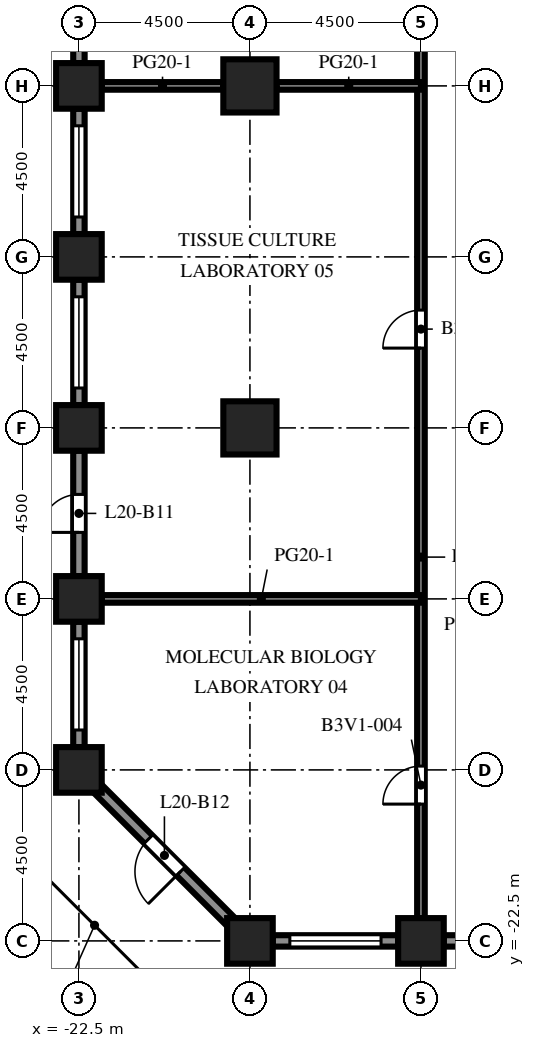
"""IFC4 building model, lengths in metres.
Left out: names, types, materials, properties, quantities, classifications, styles, units other than length and angle.
Written with IfcOpenShell. Run it as: python <this file> out.ifc"""

import sys

from ifc_helpers import new_model, si_unit, direction, frame, frame_2d, origin, origin_2d, place, context, subcontext, project, spatial, rectangle, extrude, element, fill, save


model = new_model("IFC4")
c1 = context("Model", 3, precision=1e-05, world=origin(), true_north=direction((0.0, 1.0)))
c2 = subcontext(c1, "Body", "Model", "MODEL_VIEW")
j1 = project(units=[si_unit("LENGTHUNIT", "METRE"), si_unit("PLANEANGLEUNIT", "RADIAN")], contexts=[c1])
p1 = place(None, origin())
s1 = spatial("IfcSite", under=j1, at=p1, CompositionType="ELEMENT")
p2 = place(p1, origin())
s2 = spatial("IfcBuilding", under=s1, at=p2, CompositionType="ELEMENT")
p3 = place(p2, frame((0.0, 0.0, 90.2)))
s3 = spatial("IfcBuildingStorey", under=s2, at=p3, CompositionType="ELEMENT", Elevation=90.2)
for number, where, z_axis, x_axis in (
    (1, (-22.5, -18.0, 0.0), (0.0, 0.0, 1.0), (1.0, 0.0, 0.0)),
    (2, (-22.5, -13.5, 0.0), (0.0, 0.0, 1.0), (1.0, 0.0, 0.0)),
    (3, (-22.5, -9.0, 0.0), (0.0, 0.0, 1.0), (1.0, 0.0, 0.0)),
    (4, (-22.5, -4.5, 0.0), (0.0, 0.0, 1.0), (1.0, 0.0, 0.0)),
    (5, (-22.5, 0.0, 0.0), (0.0, 0.0, 1.0), (1.0, 0.0, 0.0)),
    (6, (-18.0, -22.5, 0.0), (0.0, 0.0, 1.0), (1.0, 0.0, 0.0)),
    (7, (-13.5, -22.5, 0.0), (0.0, 0.0, 1.0), (1.0, 0.0, 0.0)),
):
    element("IfcColumn", number, at=place(p3, frame(where, z_axis=z_axis, x_axis=x_axis)), inside=s3, PredefinedType="COLUMN", context=c2, shape_type="SweptSolid", body=[
        extrude(rectangle(XDim=1.2, YDim=1.2, at=origin_2d()), origin(), (0.0, 0.0, 1.0), 4.1),
    ])
for number, where, z_axis, x_axis in (
    (8, (-18.0, -9.0, 0.0), (0.0, 0.0, 1.0), (1.0, 0.0, 0.0)),
    (9, (-18.0, 0.0, 0.0), (0.0, 0.0, 1.0), (1.0, 0.0, 0.0)),
):
    element("IfcColumn", number, at=place(p3, frame(where, z_axis=z_axis, x_axis=x_axis)), inside=s3, PredefinedType="COLUMN", context=c2, shape_type="SweptSolid", body=[
        extrude(rectangle(XDim=1.4, YDim=1.4, at=origin_2d()), origin(), (0.0, 0.0, 1.0), 4.1),
    ])
p4 = place(p3, frame((-14.1, -22.5, 0.0), z_axis=(0.0, 0.0, 1.0), x_axis=(-1.0, 0.0, 0.0)))
e10 = element("IfcWall", 10, at=p4, inside=s3, PredefinedType="SOLIDWALL", context=c2, shape_type="SweptSolid", body=[
    extrude(rectangle(XDim=3.3, YDim=0.3, at=frame_2d((1.65, 0.0))), origin(), (0.0, 0.0, 1.0), 2.75),
])
p5 = place(p4, frame((0.45, 0.0, 0.8)))
e11 = element("IfcOpeningElement", 11, at=p5, cuts=e10, PredefinedType="OPENING", context=c2, shape_type="SweptSolid", body=[
    extrude(rectangle(XDim=2.4, YDim=1.7, at=frame_2d((1.2, 0.85))), frame((0.0, 0.16, 0.0), z_axis=(0.0, -1.0, 0.0), x_axis=(1.0, 0.0, 0.0)), (0.0, 0.0, 1.0), 0.32),
])
p6 = place(p3, frame((-9.6, -22.5, 0.0), z_axis=(0.0, 0.0, 1.0), x_axis=(-1.0, 0.0, 0.0)))
e12 = element("IfcWall", 12, at=p6, inside=s3, PredefinedType="SOLIDWALL", context=c2, shape_type="SweptSolid", body=[
    extrude(rectangle(XDim=3.3, YDim=0.3, at=frame_2d((1.65, 0.0))), origin(), (0.0, 0.0, 1.0), 2.75),
])
p7 = place(p6, frame((1.15, 0.0, 0.0)))
e13 = element("IfcOpeningElement", 13, at=p7, cuts=e12, PredefinedType="OPENING", context=c2, shape_type="SweptSolid", body=[
    extrude(rectangle(XDim=1.0, YDim=2.2, at=frame_2d((0.5, 1.1))), frame((0.0, 0.16, 0.0), z_axis=(0.0, -1.0, 0.0), x_axis=(1.0, 0.0, 0.0)), (0.0, 0.0, 1.0), 0.32),
])
p8 = place(p3, frame((-22.5, 0.6, 0.0), z_axis=(0.0, 0.0, 1.0), x_axis=(0.0, 1.0, 0.0)))
e14 = element("IfcWall", 14, at=p8, inside=s3, PredefinedType="SOLIDWALL", context=c2, shape_type="SweptSolid", body=[
    extrude(rectangle(XDim=3.3, YDim=0.3, at=frame_2d((1.65, 0.0))), origin(), (0.0, 0.0, 1.0), 2.75),
])
p9 = place(p8, frame((0.45, 0.0, 0.8)))
e15 = element("IfcOpeningElement", 15, at=p9, cuts=e14, PredefinedType="OPENING", context=c2, shape_type="SweptSolid", body=[
    extrude(rectangle(XDim=2.4, YDim=1.7, at=frame_2d((1.2, 0.85))), frame((0.0, 0.16, 0.0), z_axis=(0.0, -1.0, 0.0), x_axis=(1.0, 0.0, 0.0)), (0.0, 0.0, 1.0), 0.32),
])
p10 = place(p3, frame((-22.5, -3.9, 0.0), z_axis=(0.0, 0.0, 1.0), x_axis=(0.0, 1.0, 0.0)))
e16 = element("IfcWall", 16, at=p10, inside=s3, PredefinedType="SOLIDWALL", context=c2, shape_type="SweptSolid", body=[
    extrude(rectangle(XDim=3.3, YDim=0.3, at=frame_2d((1.65, 0.0))), origin(), (0.0, 0.0, 1.0), 2.75),
])
p11 = place(p10, frame((0.45, 0.0, 0.8)))
e17 = element("IfcOpeningElement", 17, at=p11, cuts=e16, PredefinedType="OPENING", context=c2, shape_type="SweptSolid", body=[
    extrude(rectangle(XDim=2.4, YDim=1.7, at=frame_2d((1.2, 0.85))), frame((0.0, 0.16, 0.0), z_axis=(0.0, -1.0, 0.0), x_axis=(1.0, 0.0, 0.0)), (0.0, 0.0, 1.0), 0.32),
])
p12 = place(p3, frame((-22.5, -8.4, 0.0), z_axis=(0.0, 0.0, 1.0), x_axis=(0.0, 1.0, 0.0)))
e18 = element("IfcWall", 18, at=p12, inside=s3, PredefinedType="SOLIDWALL", context=c2, shape_type="SweptSolid", body=[
    extrude(rectangle(XDim=3.3, YDim=0.3, at=frame_2d((1.65, 0.0))), origin(), (0.0, 0.0, 1.0), 2.75),
])
p13 = place(p12, frame((0.45, 0.0, 0.8)))
e19 = element("IfcOpeningElement", 19, at=p13, cuts=e18, PredefinedType="OPENING", context=c2, shape_type="SweptSolid", body=[
    extrude(rectangle(XDim=2.4, YDim=1.7, at=frame_2d((1.2, 0.85))), frame((0.0, 0.16, 0.0), z_axis=(0.0, -1.0, 0.0), x_axis=(1.0, 0.0, 0.0)), (0.0, 0.0, 1.0), 0.32),
])
p14 = place(p3, frame((-22.5, -12.9, 0.0), z_axis=(0.0, 0.0, 1.0), x_axis=(0.0, 1.0, 0.0)))
e20 = element("IfcWall", 20, at=p14, inside=s3, PredefinedType="SOLIDWALL", context=c2, shape_type="SweptSolid", body=[
    extrude(rectangle(XDim=3.3, YDim=0.3, at=frame_2d((1.65, 0.0))), origin(), (0.0, 0.0, 1.0), 2.75),
])
p15 = place(p14, frame((1.15, 0.0, 0.0)))
e21 = element("IfcOpeningElement", 21, at=p15, cuts=e20, PredefinedType="OPENING", context=c2, shape_type="SweptSolid", body=[
    extrude(rectangle(XDim=1.0, YDim=2.2, at=frame_2d((0.5, 1.1))), frame((0.0, 0.16, 0.0), z_axis=(0.0, -1.0, 0.0), x_axis=(1.0, 0.0, 0.0)), (0.0, 0.0, 1.0), 0.32),
])
p16 = place(p3, frame((-22.5, -17.4, 0.0), z_axis=(0.0, 0.0, 1.0), x_axis=(0.0, 1.0, 0.0)))
e22 = element("IfcWall", 22, at=p16, inside=s3, PredefinedType="SOLIDWALL", context=c2, shape_type="SweptSolid", body=[
    extrude(rectangle(XDim=3.3, YDim=0.3, at=frame_2d((1.65, 0.0))), origin(), (0.0, 0.0, 1.0), 2.75),
])
p17 = place(p16, frame((0.45, 0.0, 0.8)))
e23 = element("IfcOpeningElement", 23, at=p17, cuts=e22, PredefinedType="OPENING", context=c2, shape_type="SweptSolid", body=[
    extrude(rectangle(XDim=2.4, YDim=1.7, at=frame_2d((1.2, 0.85))), frame((0.0, 0.16, 0.0), z_axis=(0.0, -1.0, 0.0), x_axis=(1.0, 0.0, 0.0)), (0.0, 0.0, 1.0), 0.32),
])
p18 = place(p3, frame((-18.494, -22.006, 0.0), z_axis=(0.0, 0.0, 1.0), x_axis=(-0.707106781187, 0.707106781187, 0.0)))
e24 = element("IfcWall", 24, at=p18, inside=s3, PredefinedType="SOLIDWALL", context=c2, shape_type="SweptSolid", body=[
    extrude(rectangle(XDim=4.967, YDim=0.3, at=frame_2d((2.483, 0.0))), origin(), (0.0, 0.0, 1.0), 2.75),
])
p19 = place(p18, frame((1.884, 0.0, 0.0)))
e25 = element("IfcOpeningElement", 25, at=p19, cuts=e24, PredefinedType="OPENING", context=c2, shape_type="SweptSolid", body=[
    extrude(rectangle(XDim=1.2, YDim=2.2, at=frame_2d((0.6, 1.1))), frame((0.0, 0.16, 0.0), z_axis=(0.0, -1.0, 0.0), x_axis=(1.0, 0.0, 0.0)), (0.0, 0.0, 1.0), 0.32),
])
p20 = place(p3, frame((-13.5, -21.9, 0.0), z_axis=(0.0, 0.0, 1.0), x_axis=(0.0, 1.0, 0.0)))
e26 = element("IfcWall", 26, at=p20, inside=s3, PredefinedType="PARTITIONING", context=c2, shape_type="SweptSolid", body=[
    extrude(rectangle(XDim=52.8, YDim=0.2, at=frame_2d((26.4, 0.0))), origin(), (0.0, 0.0, 1.0), 3.65),
])
p21 = place(p20, frame((3.0, 0.0, 0.0)))
e27 = element("IfcOpeningElement", 27, at=p21, cuts=e26, PredefinedType="OPENING", context=c2, shape_type="SweptSolid", body=[
    extrude(rectangle(XDim=1.0, YDim=2.1, at=frame_2d((0.5, 1.05))), frame((0.0, 0.11, 0.0), z_axis=(0.0, -1.0, 0.0), x_axis=(1.0, 0.0, 0.0)), (0.0, 0.0, 1.0), 0.22),
])
p22 = place(p20, frame((15.0, 0.0, 0.0)))
e28 = element("IfcOpeningElement", 28, at=p22, cuts=e26, PredefinedType="OPENING", context=c2, shape_type="SweptSolid", body=[
    extrude(rectangle(XDim=1.0, YDim=2.1, at=frame_2d((0.5, 1.05))), frame((0.0, 0.11, 0.0), z_axis=(0.0, -1.0, 0.0), x_axis=(1.0, 0.0, 0.0)), (0.0, 0.0, 1.0), 0.22),
])
p23 = place(p20, frame((25.75, 0.0, 0.0)))
e29 = element("IfcOpeningElement", 29, at=p23, cuts=e26, PredefinedType="OPENING", context=c2, shape_type="SweptSolid", body=[
    extrude(rectangle(XDim=1.0, YDim=2.1, at=frame_2d((0.5, 1.05))), frame((0.0, 0.11, 0.0), z_axis=(0.0, -1.0, 0.0), x_axis=(1.0, 0.0, 0.0)), (0.0, 0.0, 1.0), 0.22),
])
p24 = place(p20, frame((34.5, 0.0, 0.0)))
e30 = element("IfcOpeningElement", 30, at=p24, cuts=e26, PredefinedType="OPENING", context=c2, shape_type="SweptSolid", body=[
    extrude(rectangle(XDim=1.0, YDim=2.1, at=frame_2d((0.5, 1.05))), frame((0.0, 0.11, 0.0), z_axis=(0.0, -1.0, 0.0), x_axis=(1.0, 0.0, 0.0)), (0.0, 0.0, 1.0), 0.22),
])
p25 = place(p20, frame((41.5, 0.0, 0.0)))
e31 = element("IfcOpeningElement", 31, at=p25, cuts=e26, PredefinedType="OPENING", context=c2, shape_type="SweptSolid", body=[
    extrude(rectangle(XDim=1.0, YDim=2.1, at=frame_2d((0.5, 1.05))), frame((0.0, 0.11, 0.0), z_axis=(0.0, -1.0, 0.0), x_axis=(1.0, 0.0, 0.0)), (0.0, 0.0, 1.0), 0.22),
])
p26 = place(p20, frame((48.25, 0.0, 0.0)))
e32 = element("IfcOpeningElement", 32, at=p26, cuts=e26, PredefinedType="OPENING", context=c2, shape_type="SweptSolid", body=[
    extrude(rectangle(XDim=1.0, YDim=2.1, at=frame_2d((0.5, 1.05))), frame((0.0, 0.11, 0.0), z_axis=(0.0, -1.0, 0.0), x_axis=(1.0, 0.0, 0.0)), (0.0, 0.0, 1.0), 0.22),
])
p27 = place(p3, frame((-21.9, -13.5, 0.0), z_axis=(0.0, 0.0, 1.0), x_axis=(1.0, 0.0, 0.0)))
e33 = element("IfcWall", 33, at=p27, inside=s3, PredefinedType="PARTITIONING", context=c2, shape_type="SweptSolid", body=[
    extrude(rectangle(XDim=8.4, YDim=0.2, at=frame_2d((4.2, 0.0))), origin(), (0.0, 0.0, 1.0), 3.65),
])
p28 = place(p3, frame((-21.9, 0.0, 0.0), z_axis=(0.0, 0.0, 1.0), x_axis=(1.0, 0.0, 0.0)))
e34 = element("IfcWall", 34, at=p28, inside=s3, PredefinedType="PARTITIONING", context=c2, shape_type="SweptSolid", body=[
    extrude(rectangle(XDim=3.2, YDim=0.2, at=frame_2d((1.6, 0.0))), origin(), (0.0, 0.0, 1.0), 3.65),
])
p29 = place(p3, frame((-17.3, 0.0, 0.0), z_axis=(0.0, 0.0, 1.0), x_axis=(1.0, 0.0, 0.0)))
e35 = element("IfcWall", 35, at=p29, inside=s3, PredefinedType="PARTITIONING", context=c2, shape_type="SweptSolid", body=[
    extrude(rectangle(XDim=3.8, YDim=0.2, at=frame_2d((1.9, 0.0))), origin(), (0.0, 0.0, 1.0), 3.65),
])
p30 = place(p5, origin())
e36 = element("IfcWindow", 36, at=p30, inside=s3, PartitioningType="SINGLE_PANEL", PredefinedType="WINDOW", context=c2, shape_type="SweptSolid", body=[
    extrude(rectangle(XDim=2.4, YDim=1.7, at=frame_2d((1.2, 0.85))), frame((0.0, 0.03, 0.0), z_axis=(0.0, -1.0, 0.0), x_axis=(1.0, 0.0, 0.0)), (0.0, 0.0, 1.0), 0.06),
])
fill(e11, e36)
p31 = place(p11, origin())
e37 = element("IfcWindow", 37, at=p31, inside=s3, PartitioningType="SINGLE_PANEL", PredefinedType="WINDOW", context=c2, shape_type="SweptSolid", body=[
    extrude(rectangle(XDim=2.4, YDim=1.7, at=frame_2d((1.2, 0.85))), frame((0.0, 0.03, 0.0), z_axis=(0.0, -1.0, 0.0), x_axis=(1.0, 0.0, 0.0)), (0.0, 0.0, 1.0), 0.06),
])
fill(e17, e37)
p32 = place(p13, origin())
e38 = element("IfcWindow", 38, at=p32, inside=s3, PartitioningType="SINGLE_PANEL", PredefinedType="WINDOW", context=c2, shape_type="SweptSolid", body=[
    extrude(rectangle(XDim=2.4, YDim=1.7, at=frame_2d((1.2, 0.85))), frame((0.0, 0.03, 0.0), z_axis=(0.0, -1.0, 0.0), x_axis=(1.0, 0.0, 0.0)), (0.0, 0.0, 1.0), 0.06),
])
fill(e19, e38)
p33 = place(p15, origin())
e39 = element("IfcDoor", 39, at=p33, inside=s3, OperationType="SINGLE_SWING_LEFT", PredefinedType="DOOR", context=c2, shape_type="SweptSolid", body=[
    extrude(rectangle(XDim=1.0, YDim=2.2, at=frame_2d((0.5, 1.1))), frame((0.0, 0.025, 0.0), z_axis=(0.0, -1.0, 0.0), x_axis=(1.0, 0.0, 0.0)), (0.0, 0.0, 1.0), 0.05),
])
fill(e21, e39)
p34 = place(p17, origin())
e40 = element("IfcWindow", 40, at=p34, inside=s3, PartitioningType="SINGLE_PANEL", PredefinedType="WINDOW", context=c2, shape_type="SweptSolid", body=[
    extrude(rectangle(XDim=2.4, YDim=1.7, at=frame_2d((1.2, 0.85))), frame((0.0, 0.03, 0.0), z_axis=(0.0, -1.0, 0.0), x_axis=(1.0, 0.0, 0.0)), (0.0, 0.0, 1.0), 0.06),
])
fill(e23, e40)
p35 = place(p19, origin())
e41 = element("IfcDoor", 41, at=p35, inside=s3, OperationType="SINGLE_SWING_LEFT", PredefinedType="DOOR", context=c2, shape_type="SweptSolid", body=[
    extrude(rectangle(XDim=1.2, YDim=2.2, at=frame_2d((0.6, 1.1))), frame((0.0, 0.025, 0.0), z_axis=(0.0, -1.0, 0.0), x_axis=(1.0, 0.0, 0.0)), (0.0, 0.0, 1.0), 0.05),
])
fill(e25, e41)
p36 = place(p21, origin())
e42 = element("IfcDoor", 42, at=p36, inside=s3, OperationType="SINGLE_SWING_LEFT", PredefinedType="DOOR", context=c2, shape_type="SweptSolid", body=[
    extrude(rectangle(XDim=1.0, YDim=2.1, at=frame_2d((0.5, 1.05))), frame((0.0, 0.025, 0.0), z_axis=(0.0, -1.0, 0.0), x_axis=(1.0, 0.0, 0.0)), (0.0, 0.0, 1.0), 0.05),
])
fill(e27, e42)
p37 = place(p22, origin())
e43 = element("IfcDoor", 43, at=p37, inside=s3, OperationType="SINGLE_SWING_LEFT", PredefinedType="DOOR", context=c2, shape_type="SweptSolid", body=[
    extrude(rectangle(XDim=1.0, YDim=2.1, at=frame_2d((0.5, 1.05))), frame((0.0, 0.025, 0.0), z_axis=(0.0, -1.0, 0.0), x_axis=(1.0, 0.0, 0.0)), (0.0, 0.0, 1.0), 0.05),
])
fill(e28, e43)
save(model, sys.argv[1])
